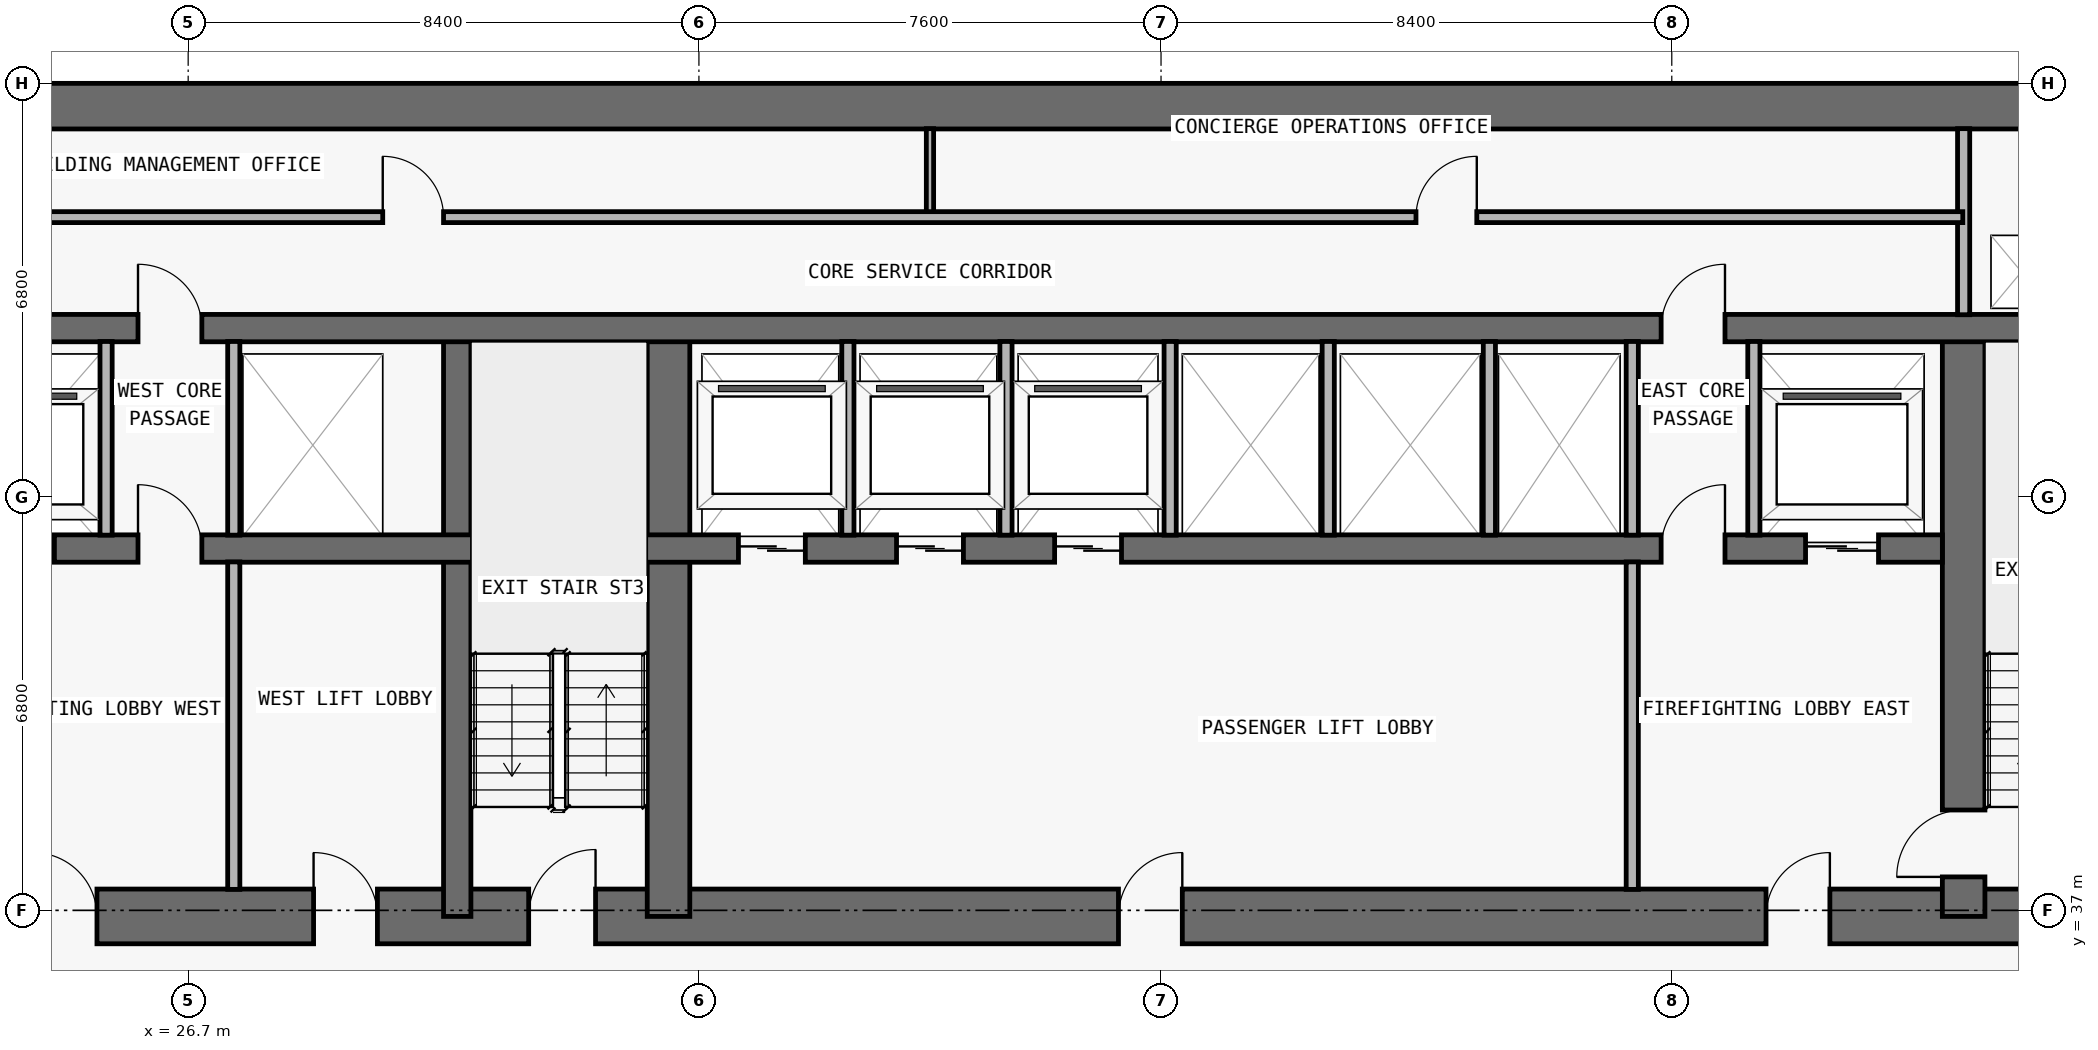
"""IFC4 building model, lengths in metres.
Left out: names, types, materials, properties, quantities, classifications, styles, units other than length and angle.
Written with IfcOpenShell. Run it as: python <this file> out.ifc"""

import sys

from ifc_helpers import new_model, si_unit, direction, frame, frame_2d, origin, place, context, subcontext, project, spatial, rectangle, extrude, element, fill, save


model = new_model("IFC4")
c1 = context("Model", 3, precision=1e-05, world=origin(), true_north=direction((0.0, 1.0)))
c2 = subcontext(c1, "Body", "Model", "MODEL_VIEW")
j1 = project(units=[si_unit("LENGTHUNIT", "METRE"), si_unit("PLANEANGLEUNIT", "RADIAN")], contexts=[c1])
p1 = place(None, origin())
s1 = spatial("IfcSite", under=j1, at=p1, CompositionType="ELEMENT")
p2 = place(p1, origin())
s2 = spatial("IfcBuilding", under=s1, at=p2, CompositionType="ELEMENT")
p3 = place(p2, frame((0.0, 0.0, 30.0)))
s3 = spatial("IfcBuildingStorey", under=s2, at=p3, CompositionType="ELEMENT", Elevation=30.0)
p4 = place(p3, frame((17.75, 36.9, 0.0), z_axis=(0.0, 0.0, 1.0), x_axis=(1.0, 0.0, 0.0)))
e1 = element("IfcWall", 1, at=p4, inside=s3, PredefinedType="SHEAR", context=c2, shape_type="SweptSolid", body=[
    extrude(rectangle(XDim=42.3, YDim=0.9, at=frame_2d((21.15, 0.0))), origin(), (0.0, 0.0, 1.0), 3.05),
])
p5 = place(p4, frame((14.55, 0.0, 0.0)))
e2 = element("IfcOpeningElement", 2, at=p5, cuts=e1, PredefinedType="OPENING", context=c2, shape_type="SweptSolid", body=[
    extrude(rectangle(XDim=1.1, YDim=2.15, at=frame_2d((0.55, 1.075))), frame((0.0, 0.46, 0.0), z_axis=(0.0, -1.0, 0.0), x_axis=(1.0, 0.0, 0.0)), (0.0, 0.0, 1.0), 0.92),
])
p6 = place(p4, frame((6.4, 0.0, 0.0)))
e3 = element("IfcOpeningElement", 3, at=p6, cuts=e1, PredefinedType="OPENING", context=c2, shape_type="SweptSolid", body=[
    extrude(rectangle(XDim=1.05, YDim=2.15, at=frame_2d((0.525, 1.075))), frame((0.0, 0.46, 0.0), z_axis=(0.0, -1.0, 0.0), x_axis=(1.0, 0.0, 0.0)), (0.0, 0.0, 1.0), 0.92),
])
p7 = place(p4, frame((34.9, 0.0, 0.0)))
e4 = element("IfcOpeningElement", 4, at=p7, cuts=e1, PredefinedType="OPENING", context=c2, shape_type="SweptSolid", body=[
    extrude(rectangle(XDim=1.05, YDim=2.15, at=frame_2d((0.525, 1.075))), frame((0.0, 0.46, 0.0), z_axis=(0.0, -1.0, 0.0), x_axis=(1.0, 0.0, 0.0)), (0.0, 0.0, 1.0), 0.92),
])
p8 = place(p4, frame((11.012, 0.0, 0.0)))
e5 = element("IfcOpeningElement", 5, at=p8, cuts=e1, PredefinedType="OPENING", context=c2, shape_type="SweptSolid", body=[
    extrude(rectangle(XDim=1.05, YDim=2.15, at=frame_2d((0.525, 1.075))), frame((0.0, 0.46, 0.0), z_axis=(0.0, -1.0, 0.0), x_axis=(1.0, 0.0, 0.0)), (0.0, 0.0, 1.0), 0.92),
])
p9 = place(p4, frame((24.25, 0.0, 0.0)))
e6 = element("IfcOpeningElement", 6, at=p9, cuts=e1, PredefinedType="OPENING", context=c2, shape_type="SweptSolid", body=[
    extrude(rectangle(XDim=1.05, YDim=2.15, at=frame_2d((0.525, 1.075))), frame((0.0, 0.46, 0.0), z_axis=(0.0, -1.0, 0.0), x_axis=(1.0, 0.0, 0.0)), (0.0, 0.0, 1.0), 0.92),
])
p10 = place(p3, frame((17.75, 50.225, 0.0), z_axis=(0.0, 0.0, 1.0), x_axis=(1.0, 0.0, 0.0)))
e7 = element("IfcWall", 7, at=p10, inside=s3, PredefinedType="SHEAR", context=c2, shape_type="SweptSolid", body=[
    extrude(rectangle(XDim=42.3, YDim=0.75, at=frame_2d((21.15, 0.0))), origin(), (0.0, 0.0, 1.0), 3.05),
])
p11 = place(p3, frame((55.9, 36.9, 0.0), z_axis=(0.0, 0.0, 1.0), x_axis=(0.0, 1.0, 0.0)))
e8 = element("IfcWall", 8, at=p11, inside=s3, PredefinedType="SHEAR", context=c2, shape_type="SweptSolid", body=[
    extrude(rectangle(XDim=9.675, YDim=0.7, at=frame_2d((4.837, 0.0))), origin(), (0.0, 0.0, 1.0), 3.05),
])
p12 = place(p11, frame((0.65, 0.0, 0.0)))
e9 = element("IfcOpeningElement", 9, at=p12, cuts=e8, PredefinedType="OPENING", context=c2, shape_type="SweptSolid", body=[
    extrude(rectangle(XDim=1.1, YDim=2.15, at=frame_2d((0.55, 1.075))), frame((0.0, 0.36, 0.0), z_axis=(0.0, -1.0, 0.0), x_axis=(1.0, 0.0, 0.0)), (0.0, 0.0, 1.0), 0.72),
])
p13 = place(p3, frame((31.125, 36.9, 0.0), z_axis=(0.0, 0.0, 1.0), x_axis=(0.0, 1.0, 0.0)))
e10 = element("IfcWall", 10, at=p13, inside=s3, PredefinedType="SHEAR", context=c2, shape_type="SweptSolid", body=[
    extrude(rectangle(XDim=9.675, YDim=0.45, at=frame_2d((4.837, 0.0))), origin(), (0.0, 0.0, 1.0), 3.05),
])
p14 = place(p3, frame((34.6, 36.9, 0.0), z_axis=(0.0, 0.0, 1.0), x_axis=(0.0, 1.0, 0.0)))
e11 = element("IfcWall", 11, at=p14, inside=s3, PredefinedType="SHEAR", context=c2, shape_type="SweptSolid", body=[
    extrude(rectangle(XDim=9.675, YDim=0.7, at=frame_2d((4.837, 0.0))), origin(), (0.0, 0.0, 1.0), 3.05),
])
p15 = place(p3, frame((22.25, 42.95, 0.0), z_axis=(0.0, 0.0, 1.0), x_axis=(1.0, 0.0, 0.0)))
e12 = element("IfcWall", 12, at=p15, inside=s3, PredefinedType="SHEAR", context=c2, shape_type="SweptSolid", body=[
    extrude(rectangle(XDim=33.3, YDim=0.45, at=frame_2d((16.65, 0.0))), origin(), (0.0, 0.0, 1.0), 3.05),
])
p16 = place(p15, frame((1.05, 0.0, 0.0)))
e13 = element("IfcOpeningElement", 13, at=p16, cuts=e12, PredefinedType="OPENING", context=c2, shape_type="SweptSolid", body=[
    extrude(rectangle(XDim=1.2, YDim=2.2, at=frame_2d((0.6, 1.1))), frame((0.0, 0.235, 0.0), z_axis=(0.0, -1.0, 0.0), x_axis=(1.0, 0.0, 0.0)), (0.0, 0.0, 1.0), 0.47),
])
p17 = place(p15, frame((31.05, 0.0, 0.0)))
e14 = element("IfcOpeningElement", 14, at=p17, cuts=e12, PredefinedType="OPENING", context=c2, shape_type="SweptSolid", body=[
    extrude(rectangle(XDim=1.2, YDim=2.2, at=frame_2d((0.6, 1.1))), frame((0.0, 0.235, 0.0), z_axis=(0.0, -1.0, 0.0), x_axis=(1.0, 0.0, 0.0)), (0.0, 0.0, 1.0), 0.47),
])
p18 = place(p15, frame((13.5, 0.0, 0.0)))
e15 = element("IfcOpeningElement", 15, at=p18, cuts=e12, PredefinedType="OPENING", context=c2, shape_type="SweptSolid", body=[
    extrude(rectangle(XDim=1.1, YDim=2.2, at=frame_2d((0.55, 1.1))), frame((0.0, 0.235, 0.0), z_axis=(0.0, -1.0, 0.0), x_axis=(1.0, 0.0, 0.0)), (0.0, 0.0, 1.0), 0.47),
])
p19 = place(p15, frame((16.1, 0.0, 0.0)))
e16 = element("IfcOpeningElement", 16, at=p19, cuts=e12, PredefinedType="OPENING", context=c2, shape_type="SweptSolid", body=[
    extrude(rectangle(XDim=1.1, YDim=2.2, at=frame_2d((0.55, 1.1))), frame((0.0, 0.235, 0.0), z_axis=(0.0, -1.0, 0.0), x_axis=(1.0, 0.0, 0.0)), (0.0, 0.0, 1.0), 0.47),
])
p20 = place(p15, frame((18.7, 0.0, 0.0)))
e17 = element("IfcOpeningElement", 17, at=p20, cuts=e12, PredefinedType="OPENING", context=c2, shape_type="SweptSolid", body=[
    extrude(rectangle(XDim=1.1, YDim=2.2, at=frame_2d((0.55, 1.1))), frame((0.0, 0.235, 0.0), z_axis=(0.0, -1.0, 0.0), x_axis=(1.0, 0.0, 0.0)), (0.0, 0.0, 1.0), 0.47),
])
p21 = place(p15, frame((3.625, 0.0, 0.0)))
e18 = element("IfcOpeningElement", 18, at=p21, cuts=e12, PredefinedType="OPENING", context=c2, shape_type="SweptSolid", body=[
    extrude(rectangle(XDim=1.05, YDim=2.15, at=frame_2d((0.525, 1.075))), frame((0.0, 0.235, 0.0), z_axis=(0.0, -1.0, 0.0), x_axis=(1.0, 0.0, 0.0)), (0.0, 0.0, 1.0), 0.47),
])
p22 = place(p15, frame((28.675, 0.0, 0.0)))
e19 = element("IfcOpeningElement", 19, at=p22, cuts=e12, PredefinedType="OPENING", context=c2, shape_type="SweptSolid", body=[
    extrude(rectangle(XDim=1.05, YDim=2.15, at=frame_2d((0.525, 1.075))), frame((0.0, 0.235, 0.0), z_axis=(0.0, -1.0, 0.0), x_axis=(1.0, 0.0, 0.0)), (0.0, 0.0, 1.0), 0.47),
])
p23 = place(p3, frame((18.2, 46.575, 0.0), z_axis=(0.0, 0.0, 1.0), x_axis=(1.0, 0.0, 0.0)))
e20 = element("IfcWall", 20, at=p23, inside=s3, PredefinedType="SHEAR", context=c2, shape_type="SweptSolid", body=[
    extrude(rectangle(XDim=41.4, YDim=0.45, at=frame_2d((20.7, 0.0))), origin(), (0.0, 0.0, 1.0), 3.05),
])
p24 = place(p23, frame((7.675, 0.0, 0.0)))
e21 = element("IfcOpeningElement", 21, at=p24, cuts=e20, PredefinedType="OPENING", context=c2, shape_type="SweptSolid", body=[
    extrude(rectangle(XDim=1.05, YDim=2.15, at=frame_2d((0.525, 1.075))), frame((0.0, 0.235, 0.0), z_axis=(0.0, -1.0, 0.0), x_axis=(1.0, 0.0, 0.0)), (0.0, 0.0, 1.0), 0.47),
])
p25 = place(p23, frame((32.725, 0.0, 0.0)))
e22 = element("IfcOpeningElement", 22, at=p25, cuts=e20, PredefinedType="OPENING", context=c2, shape_type="SweptSolid", body=[
    extrude(rectangle(XDim=1.05, YDim=2.15, at=frame_2d((0.525, 1.075))), frame((0.0, 0.235, 0.0), z_axis=(0.0, -1.0, 0.0), x_axis=(1.0, 0.0, 0.0)), (0.0, 0.0, 1.0), 0.47),
])
p26 = place(p3, frame((25.35, 43.17, 0.0), z_axis=(0.0, 0.0, 1.0), x_axis=(0.0, 1.0, 0.0)))
e23 = element("IfcWall", 23, at=p26, inside=s3, PredefinedType="PARTITIONING", context=c2, shape_type="SweptSolid", body=[
    extrude(rectangle(XDim=3.185, YDim=0.2, at=frame_2d((1.593, 0.0))), origin(), (0.0, 0.0, 1.0), 3.05),
])
p27 = place(p3, frame((27.45, 37.345, 0.0), z_axis=(0.0, 0.0, 1.0), x_axis=(0.0, 1.0, 0.0)))
e24 = element("IfcWall", 24, at=p27, inside=s3, PredefinedType="PARTITIONING", context=c2, shape_type="SweptSolid", body=[
    extrude(rectangle(XDim=5.385, YDim=0.2, at=frame_2d((2.692, 0.0))), origin(), (0.0, 0.0, 1.0), 3.05),
])
for number, where, z_axis, x_axis in (
    (25, (27.45, 43.17, 0.0), (0.0, 0.0, 1.0), (0.0, 1.0, 0.0)),
    (26, (37.55, 43.17, 0.0), (0.0, 0.0, 1.0), (0.0, 1.0, 0.0)),
):
    element("IfcWall", number, at=place(p3, frame(where, z_axis=z_axis, x_axis=x_axis)), inside=s3, PredefinedType="PARTITIONING", context=c2, shape_type="SweptSolid", body=[
        extrude(rectangle(XDim=3.185, YDim=0.2, at=frame_2d((1.593, 0.0))), origin(), (0.0, 0.0, 1.0), 3.05),
    ])
p28 = place(p3, frame((38.9, 48.4, 0.0), z_axis=(0.0, 0.0, 1.0), x_axis=(0.0, 1.0, 0.0)))
e27 = element("IfcWall", 27, at=p28, inside=s3, PredefinedType="PARTITIONING", context=c2, shape_type="SweptSolid", body=[
    extrude(rectangle(XDim=1.455, YDim=0.12, at=frame_2d((0.728, 0.0))), origin(), (0.0, 0.0, 1.0), 3.05),
])
for number, where, z_axis, x_axis in (
    (28, (40.15, 43.17, 0.0), (0.0, 0.0, 1.0), (0.0, 1.0, 0.0)),
    (29, (42.85, 43.17, 0.0), (0.0, 0.0, 1.0), (0.0, 1.0, 0.0)),
    (30, (45.45, 43.17, 0.0), (0.0, 0.0, 1.0), (0.0, 1.0, 0.0)),
    (31, (48.1, 43.17, 0.0), (0.0, 0.0, 1.0), (0.0, 1.0, 0.0)),
):
    element("IfcWall", number, at=place(p3, frame(where, z_axis=z_axis, x_axis=x_axis)), inside=s3, PredefinedType="PARTITIONING", context=c2, shape_type="SweptSolid", body=[
        extrude(rectangle(XDim=3.185, YDim=0.2, at=frame_2d((1.593, 0.0))), origin(), (0.0, 0.0, 1.0), 3.05),
    ])
p29 = place(p3, frame((50.45, 37.345, 0.0), z_axis=(0.0, 0.0, 1.0), x_axis=(0.0, 1.0, 0.0)))
e32 = element("IfcWall", 32, at=p29, inside=s3, PredefinedType="PARTITIONING", context=c2, shape_type="SweptSolid", body=[
    extrude(rectangle(XDim=5.385, YDim=0.2, at=frame_2d((2.692, 0.0))), origin(), (0.0, 0.0, 1.0), 3.05),
])
for number, where, z_axis, x_axis in (
    (33, (50.45, 43.17, 0.0), (0.0, 0.0, 1.0), (0.0, 1.0, 0.0)),
    (34, (52.45, 43.17, 0.0), (0.0, 0.0, 1.0), (0.0, 1.0, 0.0)),
):
    element("IfcWall", number, at=place(p3, frame(where, z_axis=z_axis, x_axis=x_axis)), inside=s3, PredefinedType="PARTITIONING", context=c2, shape_type="SweptSolid", body=[
        extrude(rectangle(XDim=3.185, YDim=0.2, at=frame_2d((1.593, 0.0))), origin(), (0.0, 0.0, 1.0), 3.05),
    ])
p30 = place(p3, frame((55.9, 46.795, 0.0), z_axis=(0.0, 0.0, 1.0), x_axis=(0.0, 1.0, 0.0)))
e35 = element("IfcWall", 35, at=p30, inside=s3, PredefinedType="PARTITIONING", context=c2, shape_type="SweptSolid", body=[
    extrude(rectangle(XDim=3.06, YDim=0.2, at=frame_2d((1.53, 0.0))), origin(), (0.0, 0.0, 1.0), 3.05),
])
p31 = place(p3, frame((21.9, 48.4, 0.0), z_axis=(0.0, 0.0, 1.0), x_axis=(1.0, 0.0, 0.0)))
e36 = element("IfcWall", 36, at=p31, inside=s3, PredefinedType="PARTITIONING", context=c2, shape_type="SweptSolid", body=[
    extrude(rectangle(XDim=33.986, YDim=0.18, at=frame_2d((16.993, 0.0))), origin(), (0.0, 0.0, 1.0), 3.05),
])
p32 = place(p31, frame((8.0, 0.0, 0.0)))
e37 = element("IfcOpeningElement", 37, at=p32, cuts=e36, PredefinedType="OPENING", context=c2, shape_type="SweptSolid", body=[
    extrude(rectangle(XDim=1.0, YDim=2.2, at=frame_2d((0.5, 1.1))), frame((0.0, 0.1, 0.0), z_axis=(0.0, -1.0, 0.0), x_axis=(1.0, 0.0, 0.0)), (0.0, 0.0, 1.0), 0.2),
])
p33 = place(p31, frame((24.993, 0.0, 0.0)))
e38 = element("IfcOpeningElement", 38, at=p33, cuts=e36, PredefinedType="OPENING", context=c2, shape_type="SweptSolid", body=[
    extrude(rectangle(XDim=1.0, YDim=2.2, at=frame_2d((0.5, 1.1))), frame((0.0, 0.1, 0.0), z_axis=(0.0, -1.0, 0.0), x_axis=(1.0, 0.0, 0.0)), (0.0, 0.0, 1.0), 0.2),
])
p34 = place(p16, origin())
e39 = element("IfcDoor", 39, at=p34, inside=s3, OperationType="DOUBLE_DOOR_SLIDING", PredefinedType="DOOR", context=c2, shape_type="SweptSolid", body=[
    extrude(rectangle(XDim=1.2, YDim=2.2, at=frame_2d((0.6, 1.1))), frame((0.0, 0.025, 0.0), z_axis=(0.0, -1.0, 0.0), x_axis=(1.0, 0.0, 0.0)), (0.0, 0.0, 1.0), 0.05),
])
fill(e13, e39)
p35 = place(p17, origin())
e40 = element("IfcDoor", 40, at=p35, inside=s3, OperationType="DOUBLE_DOOR_SLIDING", PredefinedType="DOOR", context=c2, shape_type="SweptSolid", body=[
    extrude(rectangle(XDim=1.2, YDim=2.2, at=frame_2d((0.6, 1.1))), frame((0.0, 0.025, 0.0), z_axis=(0.0, -1.0, 0.0), x_axis=(1.0, 0.0, 0.0)), (0.0, 0.0, 1.0), 0.05),
])
fill(e14, e40)
p36 = place(p18, origin())
e41 = element("IfcDoor", 41, at=p36, inside=s3, OperationType="DOUBLE_DOOR_SLIDING", PredefinedType="DOOR", context=c2, shape_type="SweptSolid", body=[
    extrude(rectangle(XDim=1.1, YDim=2.2, at=frame_2d((0.55, 1.1))), frame((0.0, 0.025, 0.0), z_axis=(0.0, -1.0, 0.0), x_axis=(1.0, 0.0, 0.0)), (0.0, 0.0, 1.0), 0.05),
])
fill(e15, e41)
p37 = place(p19, origin())
e42 = element("IfcDoor", 42, at=p37, inside=s3, OperationType="DOUBLE_DOOR_SLIDING", PredefinedType="DOOR", context=c2, shape_type="SweptSolid", body=[
    extrude(rectangle(XDim=1.1, YDim=2.2, at=frame_2d((0.55, 1.1))), frame((0.0, 0.025, 0.0), z_axis=(0.0, -1.0, 0.0), x_axis=(1.0, 0.0, 0.0)), (0.0, 0.0, 1.0), 0.05),
])
fill(e16, e42)
p38 = place(p20, origin())
e43 = element("IfcDoor", 43, at=p38, inside=s3, OperationType="DOUBLE_DOOR_SLIDING", PredefinedType="DOOR", context=c2, shape_type="SweptSolid", body=[
    extrude(rectangle(XDim=1.1, YDim=2.2, at=frame_2d((0.55, 1.1))), frame((0.0, 0.025, 0.0), z_axis=(0.0, -1.0, 0.0), x_axis=(1.0, 0.0, 0.0)), (0.0, 0.0, 1.0), 0.05),
])
fill(e17, e43)
p39 = place(p5, origin())
e44 = element("IfcDoor", 44, at=p39, inside=s3, OperationType="SINGLE_SWING_RIGHT", PredefinedType="DOOR", context=c2, shape_type="SweptSolid", body=[
    extrude(rectangle(XDim=1.1, YDim=2.15, at=frame_2d((0.55, 1.075))), frame((0.0, 0.025, 0.0), z_axis=(0.0, -1.0, 0.0), x_axis=(1.0, 0.0, 0.0)), (0.0, 0.0, 1.0), 0.05),
])
fill(e2, e44)
p40 = place(p6, origin())
e45 = element("IfcDoor", 45, at=p40, inside=s3, OperationType="SINGLE_SWING_LEFT", PredefinedType="DOOR", context=c2, shape_type="SweptSolid", body=[
    extrude(rectangle(XDim=1.05, YDim=2.15, at=frame_2d((0.525, 1.075))), frame((0.0, 0.025, 0.0), z_axis=(0.0, -1.0, 0.0), x_axis=(1.0, 0.0, 0.0)), (0.0, 0.0, 1.0), 0.05),
])
fill(e3, e45)
p41 = place(p21, origin())
e46 = element("IfcDoor", 46, at=p41, inside=s3, OperationType="SINGLE_SWING_LEFT", PredefinedType="DOOR", context=c2, shape_type="SweptSolid", body=[
    extrude(rectangle(XDim=1.05, YDim=2.15, at=frame_2d((0.525, 1.075))), frame((0.0, 0.025, 0.0), z_axis=(0.0, -1.0, 0.0), x_axis=(1.0, 0.0, 0.0)), (0.0, 0.0, 1.0), 0.05),
])
fill(e18, e46)
p42 = place(p7, origin())
e47 = element("IfcDoor", 47, at=p42, inside=s3, OperationType="SINGLE_SWING_RIGHT", PredefinedType="DOOR", context=c2, shape_type="SweptSolid", body=[
    extrude(rectangle(XDim=1.05, YDim=2.15, at=frame_2d((0.525, 1.075))), frame((0.0, 0.025, 0.0), z_axis=(0.0, -1.0, 0.0), x_axis=(1.0, 0.0, 0.0)), (0.0, 0.0, 1.0), 0.05),
])
fill(e4, e47)
p43 = place(p12, origin())
e48 = element("IfcDoor", 48, at=p43, inside=s3, OperationType="SINGLE_SWING_LEFT", PredefinedType="DOOR", context=c2, shape_type="SweptSolid", body=[
    extrude(rectangle(XDim=1.1, YDim=2.15, at=frame_2d((0.55, 1.075))), frame((0.0, 0.025, 0.0), z_axis=(0.0, -1.0, 0.0), x_axis=(1.0, 0.0, 0.0)), (0.0, 0.0, 1.0), 0.05),
])
fill(e9, e48)
p44 = place(p22, origin())
e49 = element("IfcDoor", 49, at=p44, inside=s3, OperationType="SINGLE_SWING_RIGHT", PredefinedType="DOOR", context=c2, shape_type="SweptSolid", body=[
    extrude(rectangle(XDim=1.05, YDim=2.15, at=frame_2d((0.525, 1.075))), frame((0.0, 0.025, 0.0), z_axis=(0.0, -1.0, 0.0), x_axis=(1.0, 0.0, 0.0)), (0.0, 0.0, 1.0), 0.05),
])
fill(e19, e49)
p45 = place(p8, origin())
e50 = element("IfcDoor", 50, at=p45, inside=s3, OperationType="SINGLE_SWING_LEFT", PredefinedType="DOOR", context=c2, shape_type="SweptSolid", body=[
    extrude(rectangle(XDim=1.05, YDim=2.15, at=frame_2d((0.525, 1.075))), frame((0.0, 0.025, 0.0), z_axis=(0.0, -1.0, 0.0), x_axis=(1.0, 0.0, 0.0)), (0.0, 0.0, 1.0), 0.05),
])
fill(e5, e50)
p46 = place(p9, origin())
e51 = element("IfcDoor", 51, at=p46, inside=s3, OperationType="SINGLE_SWING_RIGHT", PredefinedType="DOOR", context=c2, shape_type="SweptSolid", body=[
    extrude(rectangle(XDim=1.05, YDim=2.15, at=frame_2d((0.525, 1.075))), frame((0.0, 0.025, 0.0), z_axis=(0.0, -1.0, 0.0), x_axis=(1.0, 0.0, 0.0)), (0.0, 0.0, 1.0), 0.05),
])
fill(e6, e51)
p47 = place(p24, origin())
e52 = element("IfcDoor", 52, at=p47, inside=s3, OperationType="SINGLE_SWING_LEFT", PredefinedType="DOOR", context=c2, shape_type="SweptSolid", body=[
    extrude(rectangle(XDim=1.05, YDim=2.15, at=frame_2d((0.525, 1.075))), frame((0.0, 0.025, 0.0), z_axis=(0.0, -1.0, 0.0), x_axis=(1.0, 0.0, 0.0)), (0.0, 0.0, 1.0), 0.05),
])
fill(e21, e52)
p48 = place(p25, origin())
e53 = element("IfcDoor", 53, at=p48, inside=s3, OperationType="SINGLE_SWING_RIGHT", PredefinedType="DOOR", context=c2, shape_type="SweptSolid", body=[
    extrude(rectangle(XDim=1.05, YDim=2.15, at=frame_2d((0.525, 1.075))), frame((0.0, 0.025, 0.0), z_axis=(0.0, -1.0, 0.0), x_axis=(1.0, 0.0, 0.0)), (0.0, 0.0, 1.0), 0.05),
])
fill(e22, e53)
p49 = place(p32, origin())
e54 = element("IfcDoor", 54, at=p49, inside=s3, OperationType="SINGLE_SWING_LEFT", PredefinedType="DOOR", context=c2, shape_type="SweptSolid", body=[
    extrude(rectangle(XDim=1.0, YDim=2.2, at=frame_2d((0.5, 1.1))), frame((0.0, 0.025, 0.0), z_axis=(0.0, -1.0, 0.0), x_axis=(1.0, 0.0, 0.0)), (0.0, 0.0, 1.0), 0.05),
])
fill(e37, e54)
p50 = place(p33, origin())
e55 = element("IfcDoor", 55, at=p50, inside=s3, OperationType="SINGLE_SWING_RIGHT", PredefinedType="DOOR", context=c2, shape_type="SweptSolid", body=[
    extrude(rectangle(XDim=1.0, YDim=2.2, at=frame_2d((0.5, 1.1))), frame((0.0, 0.025, 0.0), z_axis=(0.0, -1.0, 0.0), x_axis=(1.0, 0.0, 0.0)), (0.0, 0.0, 1.0), 0.05),
])
fill(e38, e55)
save(model, sys.argv[1])
